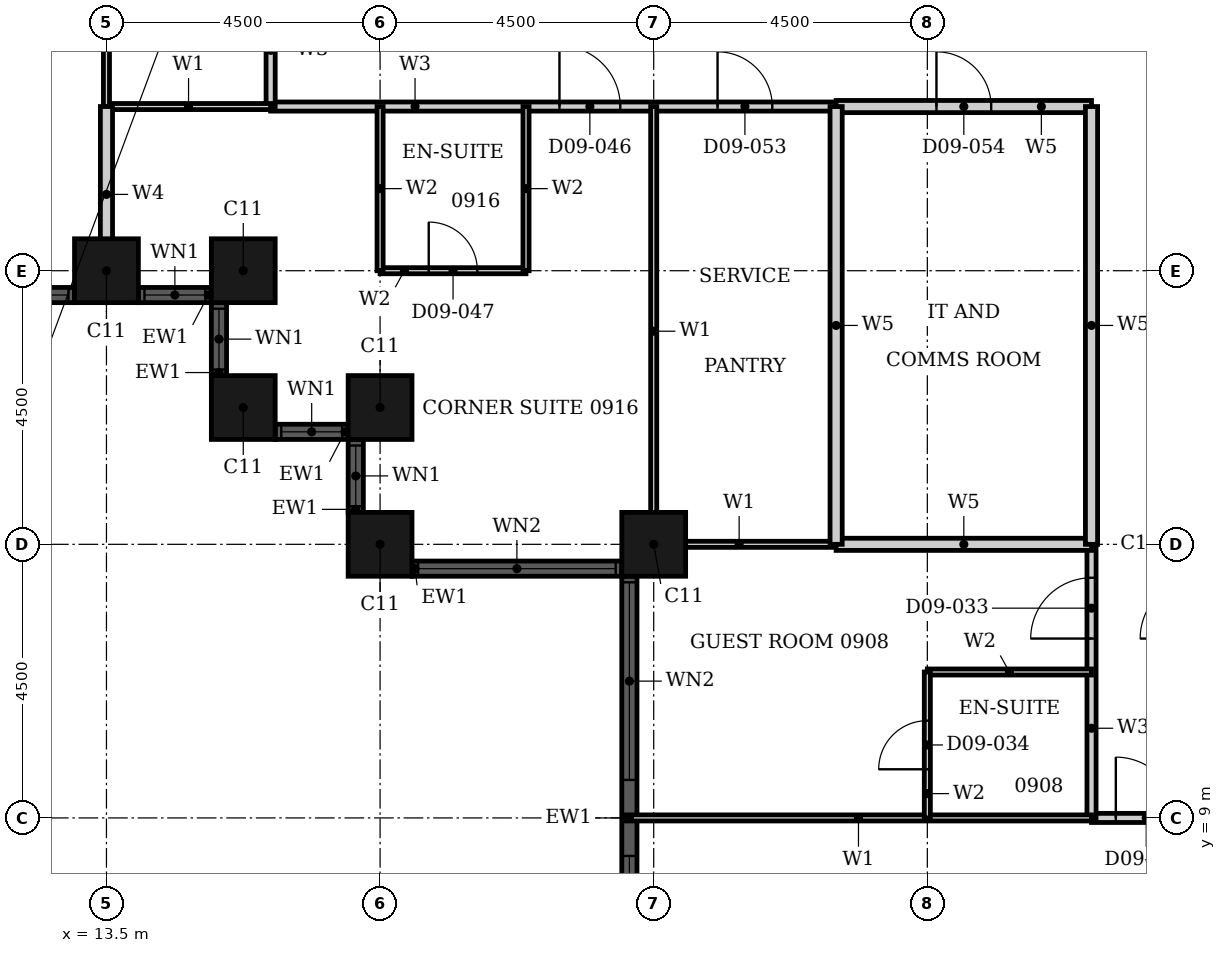
"""IFC4 building model, lengths in metres.
Left out: names, types, materials, properties, quantities, classifications, styles, units other than length and angle.
Written with IfcOpenShell. Run it as: python <this file> out.ifc"""

import sys

from ifc_helpers import new_model, si_unit, direction, frame, frame_2d, origin, origin_2d, place, context, subcontext, project, spatial, rectangle, hollow_rectangle, extrude, element, fill, save


model = new_model("IFC4")
c1 = context("Model", 3, precision=1e-05, world=origin(), true_north=direction((0.0, 1.0)))
c2 = subcontext(c1, "Body", "Model", "MODEL_VIEW")
j1 = project(units=[si_unit("LENGTHUNIT", "METRE"), si_unit("PLANEANGLEUNIT", "RADIAN")], contexts=[c1])
p1 = place(None, origin())
s1 = spatial("IfcSite", under=j1, at=p1, CompositionType="ELEMENT")
p2 = place(p1, origin())
s2 = spatial("IfcBuilding", under=s1, at=p2, CompositionType="ELEMENT")
p3 = place(p2, frame((0.0, 0.0, 44.4)))
s3 = spatial("IfcBuildingStorey", under=s2, at=p3, CompositionType="ELEMENT", Elevation=44.4)
for number, where, z_axis, x_axis in (
    (1, (13.5, 18.0, 0.0), (0.0, 0.0, 1.0), (1.0, 0.0, 0.0)),
    (2, (15.75, 18.0, 0.0), (0.0, 0.0, 1.0), (1.0, 0.0, 0.0)),
    (3, (15.75, 15.75, 0.0), (0.0, 0.0, 1.0), (1.0, 0.0, 0.0)),
    (4, (18.0, 15.75, 0.0), (0.0, 0.0, 1.0), (1.0, 0.0, 0.0)),
    (5, (18.0, 13.5, 0.0), (0.0, 0.0, 1.0), (1.0, 0.0, 0.0)),
    (6, (22.5, 13.5, 0.0), (0.0, 0.0, 1.0), (1.0, 0.0, 0.0)),
):
    element("IfcColumn", number, at=place(p3, frame(where, z_axis=z_axis, x_axis=x_axis)), inside=s3, PredefinedType="COLUMN", context=c2, shape_type="SweptSolid", body=[
        extrude(hollow_rectangle(XDim=1.05, YDim=1.05, WallThickness=0.034, at=origin_2d()), origin(), (0.0, 0.0, 1.0), 3.6),
    ])
p4 = place(p3, frame((5.025, 17.6, 0.0), z_axis=(0.0, 0.0, 1.0), x_axis=(1.0, 0.0, 0.0)))
e7 = element("IfcWall", 7, at=p4, inside=s3, PredefinedType="SOLIDWALL", context=c2, shape_type="SweptSolid", body=[
    extrude(rectangle(XDim=7.95, YDim=0.25, at=frame_2d((3.975, 0.0))), origin(), (0.0, 0.0, 1.0), 3.6),
])
p5 = place(p4, frame((0.1, 0.0, 0.9)))
e8 = element("IfcOpeningElement", 8, at=p5, cuts=e7, PredefinedType="OPENING", context=c2, shape_type="SweptSolid", body=[
    extrude(rectangle(XDim=3.25, YDim=2.08, at=frame_2d((1.625, 1.04))), frame((0.0, 0.135, 0.0), z_axis=(0.0, -1.0, 0.0), x_axis=(1.0, 0.0, 0.0)), (0.0, 0.0, 1.0), 0.27),
])
p6 = place(p4, frame((4.6, 0.0, 0.9)))
e9 = element("IfcOpeningElement", 9, at=p6, cuts=e7, PredefinedType="OPENING", context=c2, shape_type="SweptSolid", body=[
    extrude(rectangle(XDim=3.25, YDim=2.08, at=frame_2d((1.625, 1.04))), frame((0.0, 0.135, 0.0), z_axis=(0.0, -1.0, 0.0), x_axis=(1.0, 0.0, 0.0)), (0.0, 0.0, 1.0), 0.27),
])
p7 = place(p3, frame((14.025, 17.6, 0.0), z_axis=(0.0, 0.0, 1.0), x_axis=(1.0, 0.0, 0.0)))
e10 = element("IfcWall", 10, at=p7, inside=s3, PredefinedType="SOLIDWALL", context=c2, shape_type="SweptSolid", body=[
    extrude(rectangle(XDim=1.2, YDim=0.25, at=frame_2d((0.6, 0.0))), origin(), (0.0, 0.0, 1.0), 3.6),
])
p8 = place(p7, frame((0.1, 0.0, 0.9)))
e11 = element("IfcOpeningElement", 11, at=p8, cuts=e10, PredefinedType="OPENING", context=c2, shape_type="SweptSolid", body=[
    extrude(rectangle(XDim=1.0, YDim=2.08, at=frame_2d((0.5, 1.04))), frame((0.0, 0.135, 0.0), z_axis=(0.0, -1.0, 0.0), x_axis=(1.0, 0.0, 0.0)), (0.0, 0.0, 1.0), 0.27),
])
p9 = place(p3, frame((15.35, 17.475, 0.0), z_axis=(0.0, 0.0, 1.0), x_axis=(0.0, -1.0, 0.0)))
e12 = element("IfcWall", 12, at=p9, inside=s3, PredefinedType="SOLIDWALL", context=c2, shape_type="SweptSolid", body=[
    extrude(rectangle(XDim=1.2, YDim=0.25, at=frame_2d((0.6, 0.0))), origin(), (0.0, 0.0, 1.0), 3.6),
])
p10 = place(p9, frame((0.1, 0.0, 0.9)))
e13 = element("IfcOpeningElement", 13, at=p10, cuts=e12, PredefinedType="OPENING", context=c2, shape_type="SweptSolid", body=[
    extrude(rectangle(XDim=1.0, YDim=2.08, at=frame_2d((0.5, 1.04))), frame((0.0, 0.135, 0.0), z_axis=(0.0, -1.0, 0.0), x_axis=(1.0, 0.0, 0.0)), (0.0, 0.0, 1.0), 0.27),
])
p11 = place(p3, frame((16.275, 15.35, 0.0), z_axis=(0.0, 0.0, 1.0), x_axis=(1.0, 0.0, 0.0)))
e14 = element("IfcWall", 14, at=p11, inside=s3, PredefinedType="SOLIDWALL", context=c2, shape_type="SweptSolid", body=[
    extrude(rectangle(XDim=1.2, YDim=0.25, at=frame_2d((0.6, 0.0))), origin(), (0.0, 0.0, 1.0), 3.6),
])
p12 = place(p11, frame((0.1, 0.0, 0.9)))
e15 = element("IfcOpeningElement", 15, at=p12, cuts=e14, PredefinedType="OPENING", context=c2, shape_type="SweptSolid", body=[
    extrude(rectangle(XDim=1.0, YDim=2.08, at=frame_2d((0.5, 1.04))), frame((0.0, 0.135, 0.0), z_axis=(0.0, -1.0, 0.0), x_axis=(1.0, 0.0, 0.0)), (0.0, 0.0, 1.0), 0.27),
])
p13 = place(p3, frame((17.6, 15.225, 0.0), z_axis=(0.0, 0.0, 1.0), x_axis=(0.0, -1.0, 0.0)))
e16 = element("IfcWall", 16, at=p13, inside=s3, PredefinedType="SOLIDWALL", context=c2, shape_type="SweptSolid", body=[
    extrude(rectangle(XDim=1.2, YDim=0.25, at=frame_2d((0.6, 0.0))), origin(), (0.0, 0.0, 1.0), 3.6),
])
p14 = place(p13, frame((0.1, 0.0, 0.9)))
e17 = element("IfcOpeningElement", 17, at=p14, cuts=e16, PredefinedType="OPENING", context=c2, shape_type="SweptSolid", body=[
    extrude(rectangle(XDim=1.0, YDim=2.08, at=frame_2d((0.5, 1.04))), frame((0.0, 0.135, 0.0), z_axis=(0.0, -1.0, 0.0), x_axis=(1.0, 0.0, 0.0)), (0.0, 0.0, 1.0), 0.27),
])
p15 = place(p3, frame((18.525, 13.1, 0.0), z_axis=(0.0, 0.0, 1.0), x_axis=(1.0, 0.0, 0.0)))
e18 = element("IfcWall", 18, at=p15, inside=s3, PredefinedType="SOLIDWALL", context=c2, shape_type="SweptSolid", body=[
    extrude(rectangle(XDim=3.45, YDim=0.25, at=frame_2d((1.725, 0.0))), origin(), (0.0, 0.0, 1.0), 3.6),
])
p16 = place(p15, frame((0.1, 0.0, 0.9)))
e19 = element("IfcOpeningElement", 19, at=p16, cuts=e18, PredefinedType="OPENING", context=c2, shape_type="SweptSolid", body=[
    extrude(rectangle(XDim=3.25, YDim=2.08, at=frame_2d((1.625, 1.04))), frame((0.0, 0.135, 0.0), z_axis=(0.0, -1.0, 0.0), x_axis=(1.0, 0.0, 0.0)), (0.0, 0.0, 1.0), 0.27),
])
p17 = place(p3, frame((22.1, 12.975, 0.0), z_axis=(0.0, 0.0, 1.0), x_axis=(0.0, -1.0, 0.0)))
e20 = element("IfcWall", 20, at=p17, inside=s3, PredefinedType="SOLIDWALL", context=c2, shape_type="SweptSolid", body=[
    extrude(rectangle(XDim=7.95, YDim=0.25, at=frame_2d((3.975, 0.0))), origin(), (0.0, 0.0, 1.0), 3.6),
])
p18 = place(p17, frame((0.1, 0.0, 0.9)))
e21 = element("IfcOpeningElement", 21, at=p18, cuts=e20, PredefinedType="OPENING", context=c2, shape_type="SweptSolid", body=[
    extrude(rectangle(XDim=3.25, YDim=2.08, at=frame_2d((1.625, 1.04))), frame((0.0, 0.135, 0.0), z_axis=(0.0, -1.0, 0.0), x_axis=(1.0, 0.0, 0.0)), (0.0, 0.0, 1.0), 0.27),
])
p19 = place(p17, frame((4.6, 0.0, 0.9)))
e22 = element("IfcOpeningElement", 22, at=p19, cuts=e20, PredefinedType="OPENING", context=c2, shape_type="SweptSolid", body=[
    extrude(rectangle(XDim=3.25, YDim=2.08, at=frame_2d((1.625, 1.04))), frame((0.0, 0.135, 0.0), z_axis=(0.0, -1.0, 0.0), x_axis=(1.0, 0.0, 0.0)), (0.0, 0.0, 1.0), 0.27),
])
p20 = place(p3, frame((16.2, 20.7, 0.0), z_axis=(0.0, 0.0, 1.0), x_axis=(1.0, 0.0, 0.0)))
e23 = element("IfcWall", 23, at=p20, inside=s3, PredefinedType="PARTITIONING", context=c2, shape_type="SweptSolid", body=[
    extrude(rectangle(XDim=9.3, YDim=0.15, at=frame_2d((4.65, 0.0))), origin(), (0.0, 0.0, 1.0), 3.2),
])
p21 = place(p20, frame((4.75, 0.0, 0.0)))
e24 = element("IfcOpeningElement", 24, at=p21, cuts=e23, PredefinedType="OPENING", context=c2, shape_type="SweptSolid", body=[
    extrude(rectangle(XDim=1.0, YDim=2.1, at=frame_2d((0.5, 1.05))), frame((0.0, 0.085, 0.0), z_axis=(0.0, -1.0, 0.0), x_axis=(1.0, 0.0, 0.0)), (0.0, 0.0, 1.0), 0.17),
])
p22 = place(p20, frame((7.35, 0.0, 0.0)))
e25 = element("IfcOpeningElement", 25, at=p22, cuts=e23, PredefinedType="OPENING", context=c2, shape_type="SweptSolid", body=[
    extrude(rectangle(XDim=0.9, YDim=2.1, at=frame_2d((0.45, 1.05))), frame((0.0, 0.085, 0.0), z_axis=(0.0, -1.0, 0.0), x_axis=(1.0, 0.0, 0.0)), (0.0, 0.0, 1.0), 0.17),
])
p23 = place(p3, frame((29.7, 9.0, 0.0), z_axis=(0.0, 0.0, 1.0), x_axis=(1.0, 0.0, 0.0)))
e26 = element("IfcWall", 26, at=p23, inside=s3, PredefinedType="PARTITIONING", context=c2, shape_type="SweptSolid", body=[
    extrude(rectangle(XDim=1.8, YDim=0.15, at=frame_2d((0.9, 0.0))), origin(), (0.0, 0.0, 1.0), 3.2),
])
p24 = place(p23, frame((0.4, 0.0, 0.0)))
e27 = element("IfcOpeningElement", 27, at=p24, cuts=e26, PredefinedType="OPENING", context=c2, shape_type="SweptSolid", body=[
    extrude(rectangle(XDim=1.0, YDim=2.1, at=frame_2d((0.5, 1.05))), frame((0.0, 0.085, 0.0), z_axis=(0.0, -1.0, 0.0), x_axis=(1.0, 0.0, 0.0)), (0.0, 0.0, 1.0), 0.17),
])
p25 = place(p3, frame((16.2, 20.7, 0.0), z_axis=(0.0, 0.0, 1.0), x_axis=(0.0, 1.0, 0.0)))
e28 = element("IfcWall", 28, at=p25, inside=s3, PredefinedType="PARTITIONING", context=c2, shape_type="SweptSolid", body=[
    extrude(rectangle(XDim=4.5, YDim=0.15, at=frame_2d((2.25, 0.0))), origin(), (0.0, 0.0, 1.0), 3.2),
])
p26 = place(p25, frame((1.85, 0.0, 0.0)))
e29 = element("IfcOpeningElement", 29, at=p26, cuts=e28, PredefinedType="OPENING", context=c2, shape_type="SweptSolid", body=[
    extrude(rectangle(XDim=0.9, YDim=2.1, at=frame_2d((0.45, 1.05))), frame((0.0, 0.085, 0.0), z_axis=(0.0, -1.0, 0.0), x_axis=(1.0, 0.0, 0.0)), (0.0, 0.0, 1.0), 0.17),
])
p27 = place(p3, frame((29.7, 9.0, 0.0), z_axis=(0.0, 0.0, 1.0), x_axis=(0.0, 1.0, 0.0)))
e30 = element("IfcWall", 30, at=p27, inside=s3, PredefinedType="PARTITIONING", context=c2, shape_type="SweptSolid", body=[
    extrude(rectangle(XDim=4.5, YDim=0.15, at=frame_2d((2.25, 0.0))), origin(), (0.0, 0.0, 1.0), 3.2),
])
p28 = place(p27, frame((2.95, 0.0, 0.0)))
e31 = element("IfcOpeningElement", 31, at=p28, cuts=e30, PredefinedType="OPENING", context=c2, shape_type="SweptSolid", body=[
    extrude(rectangle(XDim=1.0, YDim=2.1, at=frame_2d((0.5, 1.05))), frame((0.0, 0.085, 0.0), z_axis=(0.0, -1.0, 0.0), x_axis=(1.0, 0.0, 0.0)), (0.0, 0.0, 1.0), 0.17),
])
p29 = place(p3, frame((22.31, 13.5, 0.0), z_axis=(0.0, 0.0, 1.0), x_axis=(1.0, 0.0, 0.0)))
e32 = element("IfcWall", 32, at=p29, inside=s3, PredefinedType="PARTITIONING", context=c2, shape_type="SweptSolid", body=[
    extrude(rectangle(XDim=3.19, YDim=0.1, at=frame_2d((1.595, 0.0))), origin(), (0.0, 0.0, 1.0), 2.28),
])
p30 = place(p3, frame((13.5, 20.7, 0.0), z_axis=(0.0, 0.0, 1.0), x_axis=(1.0, 0.0, 0.0)))
e33 = element("IfcWall", 33, at=p30, inside=s3, PredefinedType="PARTITIONING", context=c2, shape_type="SweptSolid", body=[
    extrude(rectangle(XDim=2.7, YDim=0.1, at=frame_2d((1.35, 0.0))), origin(), (0.0, 0.0, 1.0), 3.2),
])
p31 = place(p3, frame((22.035, 9.0, 0.0), z_axis=(0.0, 0.0, 1.0), x_axis=(1.0, 0.0, 0.0)))
e34 = element("IfcWall", 34, at=p31, inside=s3, PredefinedType="PARTITIONING", context=c2, shape_type="SweptSolid", body=[
    extrude(rectangle(XDim=7.665, YDim=0.1, at=frame_2d((3.833, 0.0))), origin(), (0.0, 0.0, 1.0), 3.2),
])
p32 = place(p3, frame((13.5, 20.7, 0.0), z_axis=(0.0, 0.0, 1.0), x_axis=(0.0, 1.0, 0.0)))
e35 = element("IfcWall", 35, at=p32, inside=s3, PredefinedType="PARTITIONING", context=c2, shape_type="SweptSolid", body=[
    extrude(rectangle(XDim=4.5, YDim=0.1, at=frame_2d((2.25, 0.0))), origin(), (0.0, 0.0, 1.0), 2.28),
])
p33 = place(p3, frame((22.5, 13.31, 0.0), z_axis=(0.0, 0.0, 1.0), x_axis=(0.0, 1.0, 0.0)))
e36 = element("IfcWall", 36, at=p33, inside=s3, PredefinedType="PARTITIONING", context=c2, shape_type="SweptSolid", body=[
    extrude(rectangle(XDim=7.39, YDim=0.1, at=frame_2d((3.695, 0.0))), origin(), (0.0, 0.0, 1.0), 3.2),
])
p34 = place(p3, frame((13.5, 17.81, 0.0), z_axis=(0.0, 0.0, 1.0), x_axis=(0.0, 1.0, 0.0)))
e37 = element("IfcWall", 37, at=p34, inside=s3, PredefinedType="PARTITIONING", context=c2, shape_type="SweptSolid", body=[
    extrude(rectangle(XDim=2.89, YDim=0.2, at=frame_2d((1.445, 0.0))), origin(), (0.0, 0.0, 1.0), 2.28),
])
p35 = place(p3, frame((27.0, 11.4, 0.0), z_axis=(0.0, 0.0, 1.0), x_axis=(1.0, 0.0, 0.0)))
e38 = element("IfcWall", 38, at=p35, inside=s3, PredefinedType="PARTITIONING", context=c2, shape_type="SweptSolid", body=[
    extrude(rectangle(XDim=2.7, YDim=0.1, at=frame_2d((1.35, 0.0))), origin(), (0.0, 0.0, 1.0), 3.2),
])
p36 = place(p3, frame((18.0, 18.0, 0.0), z_axis=(0.0, 0.0, 1.0), x_axis=(1.0, 0.0, 0.0)))
e39 = element("IfcWall", 39, at=p36, inside=s3, PredefinedType="PARTITIONING", context=c2, shape_type="SweptSolid", body=[
    extrude(rectangle(XDim=2.4, YDim=0.1, at=frame_2d((1.2, 0.0))), origin(), (0.0, 0.0, 1.0), 3.2),
])
p37 = place(p36, frame((0.8, 0.0, 0.0)))
e40 = element("IfcOpeningElement", 40, at=p37, cuts=e39, PredefinedType="OPENING", context=c2, shape_type="SweptSolid", body=[
    extrude(rectangle(XDim=0.8, YDim=2.1, at=frame_2d((0.4, 1.05))), frame((0.0, 0.06, 0.0), z_axis=(0.0, -1.0, 0.0), x_axis=(1.0, 0.0, 0.0)), (0.0, 0.0, 1.0), 0.12),
])
for number, where, z_axis, x_axis in (
    (41, (18.0, 18.0, 0.0), (0.0, 0.0, 1.0), (0.0, 1.0, 0.0)),
    (42, (20.4, 18.0, 0.0), (0.0, 0.0, 1.0), (0.0, 1.0, 0.0)),
):
    element("IfcWall", number, at=place(p3, frame(where, z_axis=z_axis, x_axis=x_axis)), inside=s3, PredefinedType="PARTITIONING", context=c2, shape_type="SweptSolid", body=[
        extrude(rectangle(XDim=2.7, YDim=0.1, at=frame_2d((1.35, 0.0))), origin(), (0.0, 0.0, 1.0), 3.2),
    ])
p38 = place(p3, frame((27.0, 9.0, 0.0), z_axis=(0.0, 0.0, 1.0), x_axis=(0.0, 1.0, 0.0)))
e43 = element("IfcWall", 43, at=p38, inside=s3, PredefinedType="PARTITIONING", context=c2, shape_type="SweptSolid", body=[
    extrude(rectangle(XDim=2.4, YDim=0.1, at=frame_2d((1.2, 0.0))), origin(), (0.0, 0.0, 1.0), 2.48),
])
p39 = place(p38, frame((0.8, 0.0, 0.0)))
e44 = element("IfcOpeningElement", 44, at=p39, cuts=e43, PredefinedType="OPENING", context=c2, shape_type="SweptSolid", body=[
    extrude(rectangle(XDim=0.8, YDim=2.1, at=frame_2d((0.4, 1.05))), frame((0.0, 0.06, 0.0), z_axis=(0.0, -1.0, 0.0), x_axis=(1.0, 0.0, 0.0)), (0.0, 0.0, 1.0), 0.12),
])
p40 = place(p3, frame((25.5, 13.5, 0.0), z_axis=(0.0, 0.0, 1.0), x_axis=(1.0, 0.0, 0.0)))
e45 = element("IfcWall", 45, at=p40, inside=s3, PredefinedType="PARTITIONING", context=c2, shape_type="SweptSolid", body=[
    extrude(rectangle(XDim=4.2, YDim=0.2, at=frame_2d((2.1, 0.0))), origin(), (0.0, 0.0, 1.0), 2.28),
])
p41 = place(p3, frame((25.5, 20.7, 0.0), z_axis=(0.0, 0.0, 1.0), x_axis=(1.0, 0.0, 0.0)))
e46 = element("IfcWall", 46, at=p41, inside=s3, PredefinedType="PARTITIONING", context=c2, shape_type="SweptSolid", body=[
    extrude(rectangle(XDim=4.2, YDim=0.2, at=frame_2d((2.1, 0.0))), origin(), (0.0, 0.0, 1.0), 3.2),
])
p42 = place(p41, frame((1.65, 0.0, 0.0)))
e47 = element("IfcOpeningElement", 47, at=p42, cuts=e46, PredefinedType="OPENING", context=c2, shape_type="SweptSolid", body=[
    extrude(rectangle(XDim=0.9, YDim=2.1, at=frame_2d((0.45, 1.05))), frame((0.0, 0.11, 0.0), z_axis=(0.0, -1.0, 0.0), x_axis=(1.0, 0.0, 0.0)), (0.0, 0.0, 1.0), 0.22),
])
for number, where, z_axis, x_axis in (
    (48, (25.5, 13.5, 0.0), (0.0, 0.0, 1.0), (0.0, 1.0, 0.0)),
    (49, (29.7, 13.5, 0.0), (0.0, 0.0, 1.0), (0.0, 1.0, 0.0)),
):
    element("IfcWall", number, at=place(p3, frame(where, z_axis=z_axis, x_axis=x_axis)), inside=s3, PredefinedType="PARTITIONING", context=c2, shape_type="SweptSolid", body=[
        extrude(rectangle(XDim=7.2, YDim=0.2, at=frame_2d((3.6, 0.0))), origin(), (0.0, 0.0, 1.0), 3.2),
    ])
p43 = place(p6, origin())
e50 = element("IfcWindow", 50, at=p43, inside=s3, PartitioningType="SINGLE_PANEL", PredefinedType="WINDOW", context=c2, shape_type="SweptSolid", body=[
    extrude(rectangle(XDim=3.25, YDim=2.08, at=frame_2d((1.625, 1.04))), frame((0.0, 0.03, 0.0), z_axis=(0.0, -1.0, 0.0), x_axis=(1.0, 0.0, 0.0)), (0.0, 0.0, 1.0), 0.06),
])
fill(e9, e50)
p44 = place(p8, origin())
e51 = element("IfcWindow", 51, at=p44, inside=s3, PartitioningType="SINGLE_PANEL", PredefinedType="WINDOW", context=c2, shape_type="SweptSolid", body=[
    extrude(rectangle(XDim=1.0, YDim=2.08, at=frame_2d((0.5, 1.04))), frame((0.0, 0.03, 0.0), z_axis=(0.0, -1.0, 0.0), x_axis=(1.0, 0.0, 0.0)), (0.0, 0.0, 1.0), 0.06),
])
fill(e11, e51)
p45 = place(p10, origin())
e52 = element("IfcWindow", 52, at=p45, inside=s3, PartitioningType="SINGLE_PANEL", PredefinedType="WINDOW", context=c2, shape_type="SweptSolid", body=[
    extrude(rectangle(XDim=1.0, YDim=2.08, at=frame_2d((0.5, 1.04))), frame((0.0, 0.03, 0.0), z_axis=(0.0, -1.0, 0.0), x_axis=(1.0, 0.0, 0.0)), (0.0, 0.0, 1.0), 0.06),
])
fill(e13, e52)
p46 = place(p12, origin())
e53 = element("IfcWindow", 53, at=p46, inside=s3, PartitioningType="SINGLE_PANEL", PredefinedType="WINDOW", context=c2, shape_type="SweptSolid", body=[
    extrude(rectangle(XDim=1.0, YDim=2.08, at=frame_2d((0.5, 1.04))), frame((0.0, 0.03, 0.0), z_axis=(0.0, -1.0, 0.0), x_axis=(1.0, 0.0, 0.0)), (0.0, 0.0, 1.0), 0.06),
])
fill(e15, e53)
p47 = place(p14, origin())
e54 = element("IfcWindow", 54, at=p47, inside=s3, PartitioningType="SINGLE_PANEL", PredefinedType="WINDOW", context=c2, shape_type="SweptSolid", body=[
    extrude(rectangle(XDim=1.0, YDim=2.08, at=frame_2d((0.5, 1.04))), frame((0.0, 0.03, 0.0), z_axis=(0.0, -1.0, 0.0), x_axis=(1.0, 0.0, 0.0)), (0.0, 0.0, 1.0), 0.06),
])
fill(e17, e54)
p48 = place(p16, origin())
e55 = element("IfcWindow", 55, at=p48, inside=s3, PartitioningType="SINGLE_PANEL", PredefinedType="WINDOW", context=c2, shape_type="SweptSolid", body=[
    extrude(rectangle(XDim=3.25, YDim=2.08, at=frame_2d((1.625, 1.04))), frame((0.0, 0.03, 0.0), z_axis=(0.0, -1.0, 0.0), x_axis=(1.0, 0.0, 0.0)), (0.0, 0.0, 1.0), 0.06),
])
fill(e19, e55)
p49 = place(p18, origin())
e56 = element("IfcWindow", 56, at=p49, inside=s3, PartitioningType="SINGLE_PANEL", PredefinedType="WINDOW", context=c2, shape_type="SweptSolid", body=[
    extrude(rectangle(XDim=3.25, YDim=2.08, at=frame_2d((1.625, 1.04))), frame((0.0, 0.03, 0.0), z_axis=(0.0, -1.0, 0.0), x_axis=(1.0, 0.0, 0.0)), (0.0, 0.0, 1.0), 0.06),
])
fill(e21, e56)
p50 = place(p19, origin())
e57 = element("IfcWindow", 57, at=p50, inside=s3, PartitioningType="SINGLE_PANEL", PredefinedType="WINDOW", context=c2, shape_type="SweptSolid", body=[
    extrude(rectangle(XDim=3.25, YDim=2.08, at=frame_2d((1.625, 1.04))), frame((0.0, 0.03, 0.0), z_axis=(0.0, -1.0, 0.0), x_axis=(1.0, 0.0, 0.0)), (0.0, 0.0, 1.0), 0.06),
])
fill(e22, e57)
p51 = place(p28, origin())
e58 = element("IfcDoor", 58, at=p51, inside=s3, OperationType="SINGLE_SWING_RIGHT", PredefinedType="DOOR", context=c2, shape_type="SweptSolid", body=[
    extrude(rectangle(XDim=1.0, YDim=2.1, at=frame_2d((0.5, 1.05))), frame((0.0, 0.025, 0.0), z_axis=(0.0, -1.0, 0.0), x_axis=(1.0, 0.0, 0.0)), (0.0, 0.0, 1.0), 0.05),
])
fill(e31, e58)
p52 = place(p39, origin())
e59 = element("IfcDoor", 59, at=p52, inside=s3, OperationType="SINGLE_SWING_RIGHT", PredefinedType="DOOR", context=c2, shape_type="SweptSolid", body=[
    extrude(rectangle(XDim=0.8, YDim=2.1, at=frame_2d((0.4, 1.05))), frame((0.0, 0.025, 0.0), z_axis=(0.0, -1.0, 0.0), x_axis=(1.0, 0.0, 0.0)), (0.0, 0.0, 1.0), 0.05),
])
fill(e44, e59)
p53 = place(p24, origin())
e60 = element("IfcDoor", 60, at=p53, inside=s3, OperationType="SINGLE_SWING_LEFT", PredefinedType="DOOR", context=c2, shape_type="SweptSolid", body=[
    extrude(rectangle(XDim=1.0, YDim=2.1, at=frame_2d((0.5, 1.05))), frame((0.0, 0.025, 0.0), z_axis=(0.0, -1.0, 0.0), x_axis=(1.0, 0.0, 0.0)), (0.0, 0.0, 1.0), 0.05),
])
fill(e27, e60)
p54 = place(p21, origin())
e61 = element("IfcDoor", 61, at=p54, inside=s3, OperationType="SINGLE_SWING_RIGHT", PredefinedType="DOOR", context=c2, shape_type="SweptSolid", body=[
    extrude(rectangle(XDim=1.0, YDim=2.1, at=frame_2d((0.5, 1.05))), frame((0.0, 0.025, 0.0), z_axis=(0.0, -1.0, 0.0), x_axis=(1.0, 0.0, 0.0)), (0.0, 0.0, 1.0), 0.05),
])
fill(e24, e61)
p55 = place(p37, origin())
e62 = element("IfcDoor", 62, at=p55, inside=s3, OperationType="SINGLE_SWING_LEFT", PredefinedType="DOOR", context=c2, shape_type="SweptSolid", body=[
    extrude(rectangle(XDim=0.8, YDim=2.1, at=frame_2d((0.4, 1.05))), frame((0.0, 0.025, 0.0), z_axis=(0.0, -1.0, 0.0), x_axis=(1.0, 0.0, 0.0)), (0.0, 0.0, 1.0), 0.05),
])
fill(e40, e62)
p56 = place(p22, origin())
e63 = element("IfcDoor", 63, at=p56, inside=s3, OperationType="SINGLE_SWING_RIGHT", PredefinedType="DOOR", context=c2, shape_type="SweptSolid", body=[
    extrude(rectangle(XDim=0.9, YDim=2.1, at=frame_2d((0.45, 1.05))), frame((0.0, 0.025, 0.0), z_axis=(0.0, -1.0, 0.0), x_axis=(1.0, 0.0, 0.0)), (0.0, 0.0, 1.0), 0.05),
])
fill(e25, e63)
p57 = place(p42, origin())
e64 = element("IfcDoor", 64, at=p57, inside=s3, OperationType="SINGLE_SWING_LEFT", PredefinedType="DOOR", context=c2, shape_type="SweptSolid", body=[
    extrude(rectangle(XDim=0.9, YDim=2.1, at=frame_2d((0.45, 1.05))), frame((0.0, 0.025, 0.0), z_axis=(0.0, -1.0, 0.0), x_axis=(1.0, 0.0, 0.0)), (0.0, 0.0, 1.0), 0.05),
])
fill(e47, e64)
save(model, sys.argv[1])
